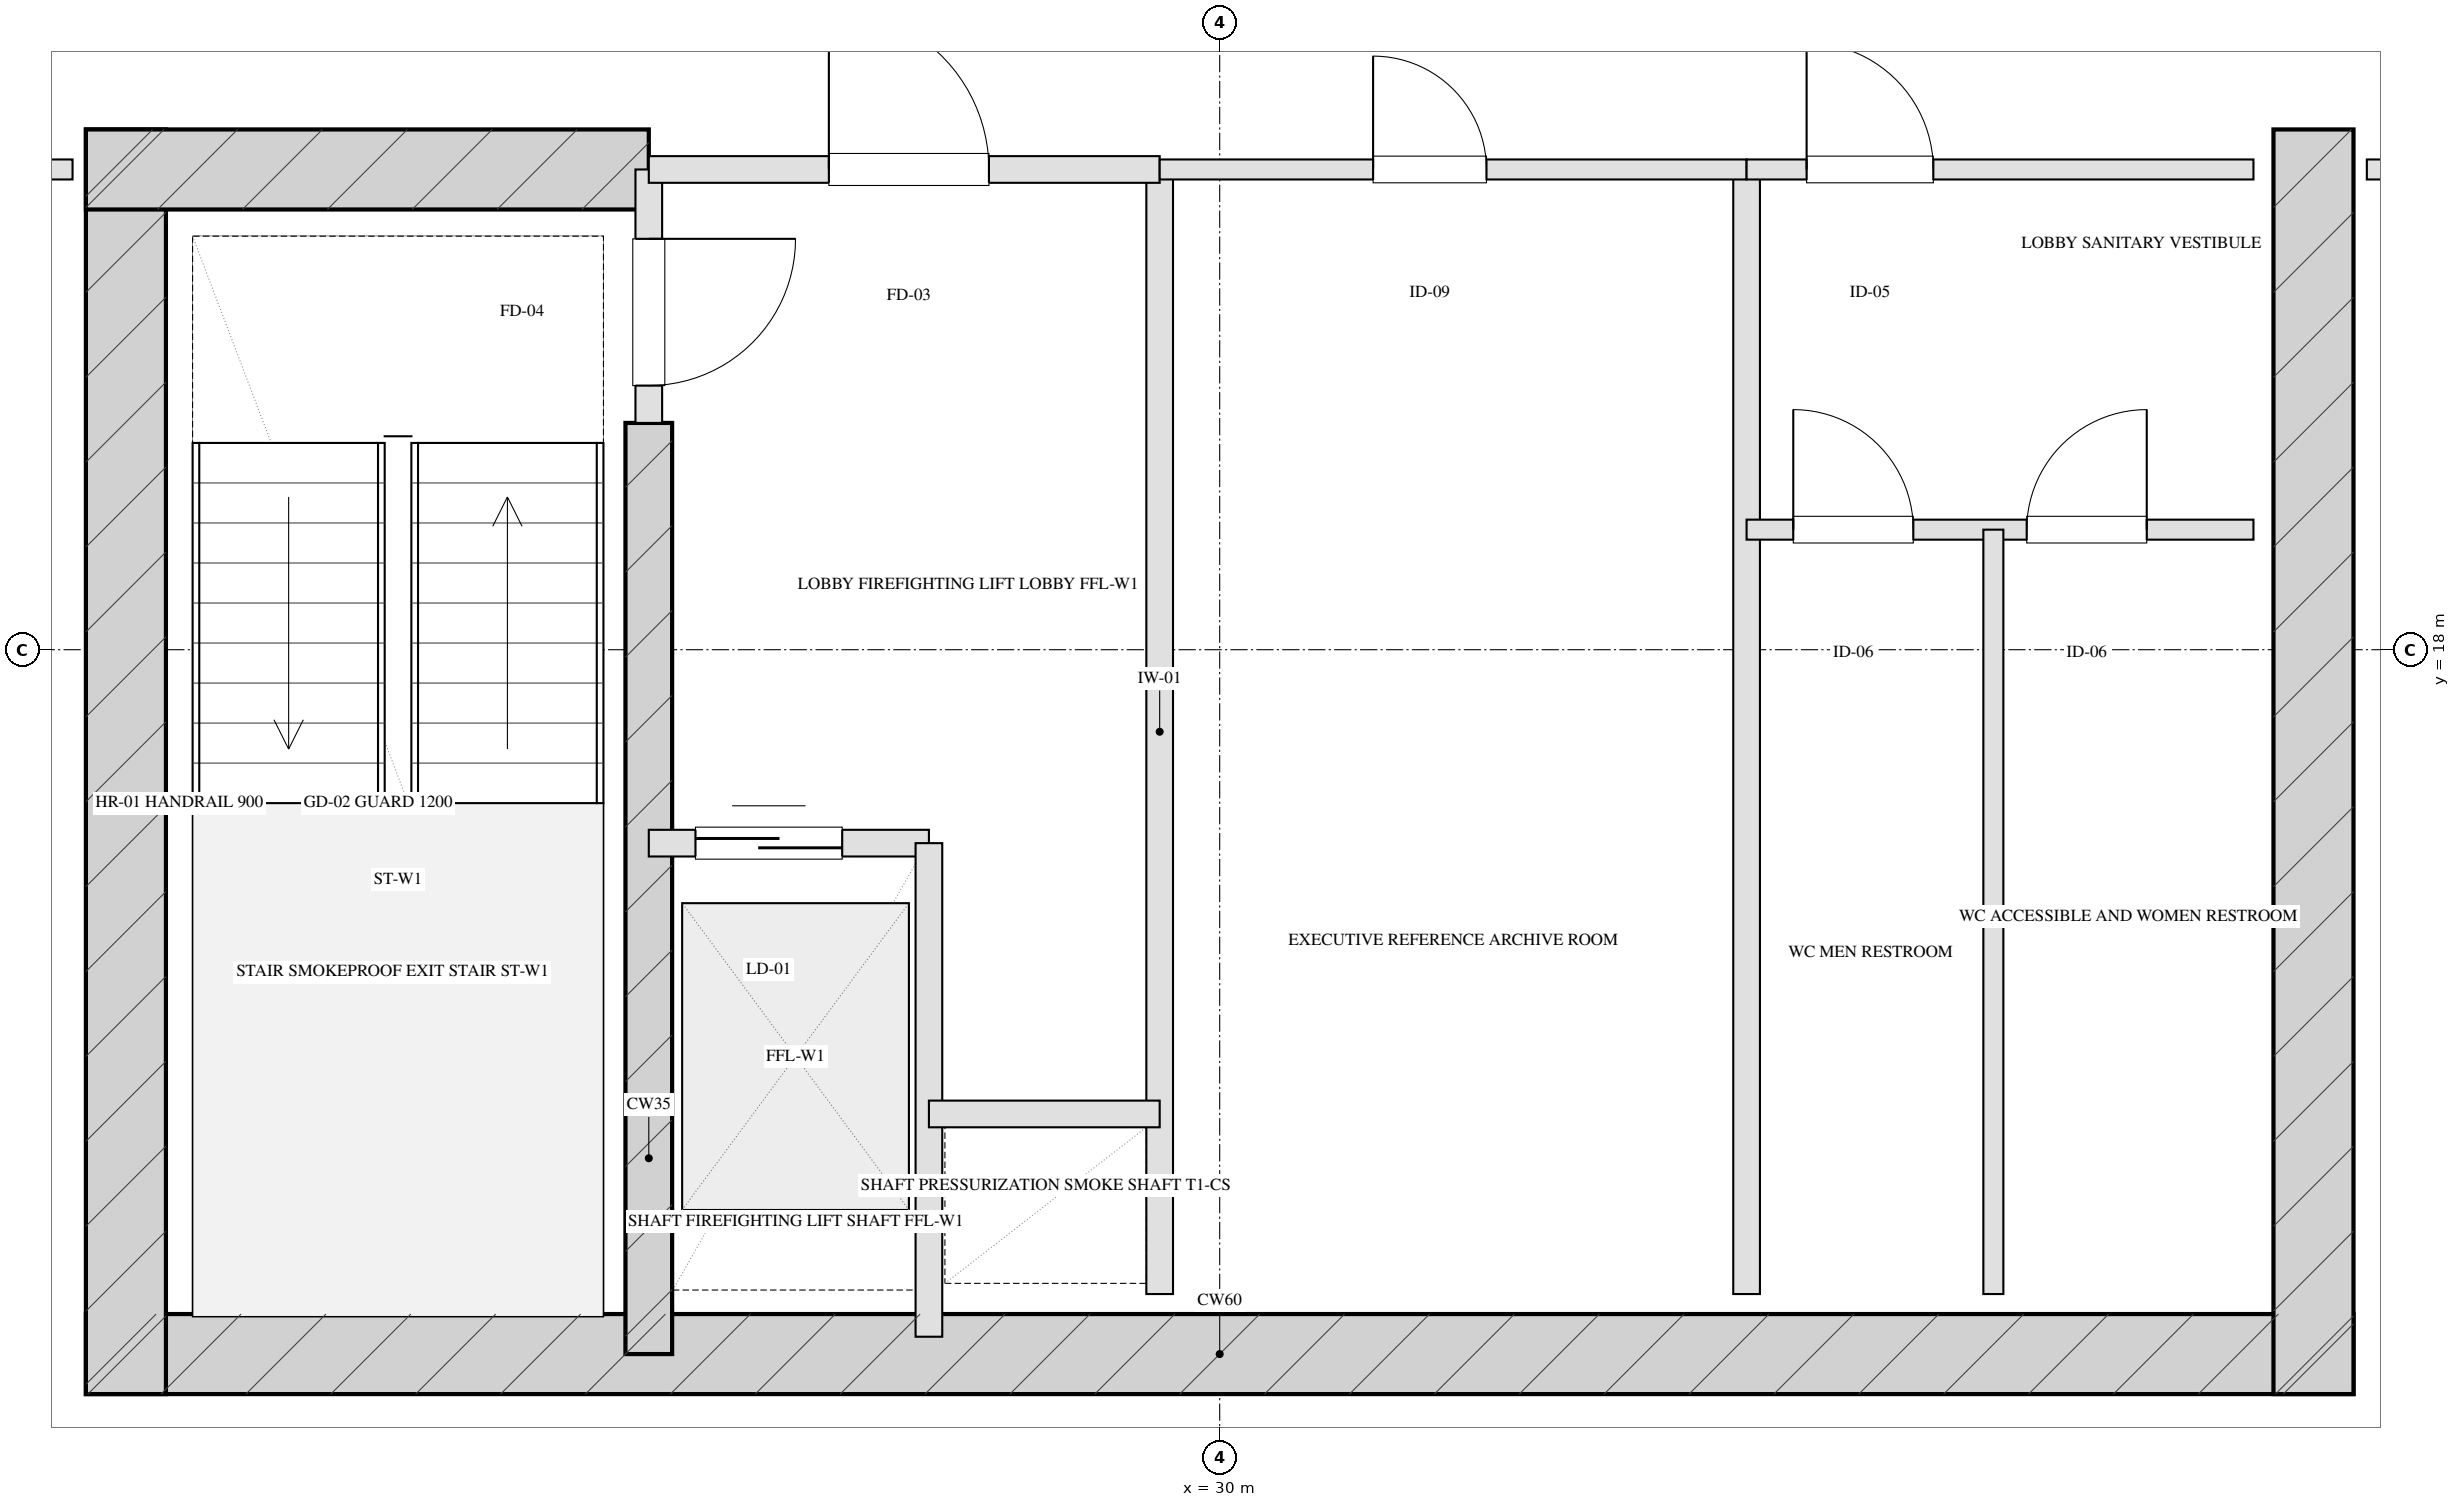
"""IFC4 building model, lengths in metres.
Left out: names, types, materials, properties, quantities, classifications, styles, units other than length and angle.
Written with IfcOpenShell. Run it as: python <this file> out.ifc"""

import sys

from ifc_helpers import new_model, si_unit, direction, frame, frame_2d, origin, place, context, subcontext, project, spatial, rectangle, extrude, element, fill, save


model = new_model("IFC4")
c1 = context("Model", 3, precision=1e-05, world=origin(), true_north=direction((0.0, 1.0)))
c2 = subcontext(c1, "Body", "Model", "MODEL_VIEW")
j1 = project(units=[si_unit("LENGTHUNIT", "METRE"), si_unit("PLANEANGLEUNIT", "RADIAN")], contexts=[c1])
p1 = place(None, origin())
s1 = spatial("IfcSite", under=j1, at=p1, CompositionType="ELEMENT")
p2 = place(p1, origin())
s2 = spatial("IfcBuilding", under=s1, at=p2, CompositionType="ELEMENT")
p3 = place(p2, frame((0.0, 0.0, 96.6)))
s3 = spatial("IfcBuildingStorey", under=s2, at=p3, CompositionType="ELEMENT", Elevation=96.6)
p4 = place(p3, frame((21.5, 12.72, 0.0), z_axis=(0.0, 0.0, 1.0), x_axis=(1.0, 0.0, 0.0)))
e1 = element("IfcWall", 1, at=p4, inside=s3, PredefinedType="SHEAR", context=c2, shape_type="SweptSolid", body=[
    extrude(rectangle(XDim=17.0, YDim=0.6, at=frame_2d((8.5, 0.0))), origin(), (0.0, 0.0, 1.0), 3.45),
])
for number, where, z_axis, x_axis in (
    (2, (21.8, 21.9, 0.0), (0.0, 0.0, 1.0), (0.0, -1.0, 0.0)),
    (3, (38.2, 21.9, 0.0), (0.0, 0.0, 1.0), (0.0, -1.0, 0.0)),
):
    element("IfcWall", number, at=place(p3, frame(where, z_axis=z_axis, x_axis=x_axis)), inside=s3, PredefinedType="SHEAR", context=c2, shape_type="SweptSolid", body=[
        extrude(rectangle(XDim=9.48, YDim=0.6, at=frame_2d((4.74, 0.0))), origin(), (0.0, 0.0, 1.0), 3.45),
    ])
p5 = place(p3, frame((25.72, 19.7, 0.0), z_axis=(0.0, 0.0, 1.0), x_axis=(0.0, -1.0, 0.0)))
e4 = element("IfcWall", 4, at=p5, inside=s3, PredefinedType="SHEAR", context=c2, shape_type="SweptSolid", body=[
    extrude(rectangle(XDim=6.98, YDim=0.35, at=frame_2d((3.49, 0.0))), origin(), (0.0, 0.0, 1.0), 3.45),
])
p6 = place(p3, frame((21.5, 21.6, 0.0), z_axis=(0.0, 0.0, 1.0), x_axis=(1.0, 0.0, 0.0)))
e5 = element("IfcWall", 5, at=p6, inside=s3, PredefinedType="SHEAR", context=c2, shape_type="SweptSolid", body=[
    extrude(rectangle(XDim=4.22, YDim=0.6, at=frame_2d((2.11, 0.0))), origin(), (0.0, 0.0, 1.0), 3.45),
])
p7 = place(p3, frame((25.72, 21.6, 0.0), z_axis=(0.0, 0.0, 1.0), x_axis=(0.0, -1.0, 0.0)))
e6 = element("IfcWall", 6, at=p7, inside=s3, PredefinedType="PARTITIONING", context=c2, shape_type="SweptSolid", body=[
    extrude(rectangle(XDim=1.9, YDim=0.2, at=frame_2d((0.95, 0.0))), origin(), (0.0, 0.0, 1.0), 3.155),
])
p8 = place(p7, frame((0.52, 0.0, 0.0)))
e7 = element("IfcOpeningElement", 7, at=p8, cuts=e6, PredefinedType="OPENING", context=c2, shape_type="SweptSolid", body=[
    extrude(rectangle(XDim=1.1, YDim=2.05, at=frame_2d((0.55, 1.025))), frame((0.0, 0.11, 0.0), z_axis=(0.0, -1.0, 0.0), x_axis=(1.0, 0.0, 0.0)), (0.0, 0.0, 1.0), 0.22),
])
p9 = place(p3, frame((29.55, 21.6, 0.0), z_axis=(0.0, 0.0, 1.0), x_axis=(0.0, -1.0, 0.0)))
e8 = element("IfcWall", 8, at=p9, inside=s3, PredefinedType="PARTITIONING", context=c2, shape_type="SweptSolid", body=[
    extrude(rectangle(XDim=8.43, YDim=0.2, at=frame_2d((4.215, 0.0))), origin(), (0.0, 0.0, 1.0), 3.155),
])
p10 = place(p3, frame((25.72, 21.6, 0.0), z_axis=(0.0, 0.0, 1.0), x_axis=(1.0, 0.0, 0.0)))
e9 = element("IfcWall", 9, at=p10, inside=s3, PredefinedType="PARTITIONING", context=c2, shape_type="SweptSolid", body=[
    extrude(rectangle(XDim=3.83, YDim=0.2, at=frame_2d((1.915, 0.0))), origin(), (0.0, 0.0, 1.0), 3.155),
])
p11 = place(p10, frame((1.35, 0.0, 0.0)))
e10 = element("IfcOpeningElement", 10, at=p11, cuts=e9, PredefinedType="OPENING", context=c2, shape_type="SweptSolid", body=[
    extrude(rectangle(XDim=1.2, YDim=2.05, at=frame_2d((0.6, 1.025))), frame((0.0, 0.11, 0.0), z_axis=(0.0, -1.0, 0.0), x_axis=(1.0, 0.0, 0.0)), (0.0, 0.0, 1.0), 0.22),
])
p12 = place(p3, frame((25.72, 16.55, 0.0), z_axis=(0.0, 0.0, 1.0), x_axis=(1.0, 0.0, 0.0)))
e11 = element("IfcWall", 11, at=p12, inside=s3, PredefinedType="PARTITIONING", context=c2, shape_type="SweptSolid", body=[
    extrude(rectangle(XDim=2.1, YDim=0.2, at=frame_2d((1.05, 0.0))), origin(), (0.0, 0.0, 1.0), 3.155),
])
p13 = place(p12, frame((0.35, 0.0, 0.0)))
e12 = element("IfcOpeningElement", 12, at=p13, cuts=e11, PredefinedType="OPENING", context=c2, shape_type="SweptSolid", body=[
    extrude(rectangle(XDim=1.1, YDim=2.05, at=frame_2d((0.55, 1.025))), frame((0.0, 0.11, 0.0), z_axis=(0.0, -1.0, 0.0), x_axis=(1.0, 0.0, 0.0)), (0.0, 0.0, 1.0), 0.22),
])
p14 = place(p3, frame((27.82, 16.55, 0.0), z_axis=(0.0, 0.0, 1.0), x_axis=(0.0, -1.0, 0.0)))
e13 = element("IfcWall", 13, at=p14, inside=s3, PredefinedType="PARTITIONING", context=c2, shape_type="SweptSolid", body=[
    extrude(rectangle(XDim=3.7, YDim=0.2, at=frame_2d((1.85, 0.0))), origin(), (0.0, 0.0, 1.0), 3.155),
])
p15 = place(p3, frame((27.82, 14.52, 0.0), z_axis=(0.0, 0.0, 1.0), x_axis=(1.0, 0.0, 0.0)))
e14 = element("IfcWall", 14, at=p15, inside=s3, PredefinedType="PARTITIONING", context=c2, shape_type="SweptSolid", body=[
    extrude(rectangle(XDim=1.73, YDim=0.2, at=frame_2d((0.865, 0.0))), origin(), (0.0, 0.0, 1.0), 3.155),
])
p16 = place(p3, frame((33.95, 21.6, 0.0), z_axis=(0.0, 0.0, 1.0), x_axis=(0.0, -1.0, 0.0)))
e15 = element("IfcWall", 15, at=p16, inside=s3, PredefinedType="PARTITIONING", context=c2, shape_type="SweptSolid", body=[
    extrude(rectangle(XDim=8.43, YDim=0.2, at=frame_2d((4.215, 0.0))), origin(), (0.0, 0.0, 1.0), 3.155),
])
p17 = place(p3, frame((29.55, 21.6, 0.0), z_axis=(0.0, 0.0, 1.0), x_axis=(1.0, 0.0, 0.0)))
e16 = element("IfcWall", 16, at=p17, inside=s3, PredefinedType="PARTITIONING", context=c2, shape_type="SweptSolid", body=[
    extrude(rectangle(XDim=4.4, YDim=0.15, at=frame_2d((2.2, 0.0))), origin(), (0.0, 0.0, 1.0), 3.155),
])
p18 = place(p17, frame((1.6, 0.0, 0.0)))
e17 = element("IfcOpeningElement", 17, at=p18, cuts=e16, PredefinedType="OPENING", context=c2, shape_type="SweptSolid", body=[
    extrude(rectangle(XDim=0.85, YDim=2.05, at=frame_2d((0.425, 1.025))), frame((0.0, 0.085, 0.0), z_axis=(0.0, -1.0, 0.0), x_axis=(1.0, 0.0, 0.0)), (0.0, 0.0, 1.0), 0.17),
])
p19 = place(p3, frame((33.95, 21.6, 0.0), z_axis=(0.0, 0.0, 1.0), x_axis=(1.0, 0.0, 0.0)))
e18 = element("IfcWall", 18, at=p19, inside=s3, PredefinedType="PARTITIONING", context=c2, shape_type="SweptSolid", body=[
    extrude(rectangle(XDim=3.8, YDim=0.15, at=frame_2d((1.9, 0.0))), origin(), (0.0, 0.0, 1.0), 3.155),
])
p20 = place(p19, frame((0.45, 0.0, 0.0)))
e19 = element("IfcOpeningElement", 19, at=p20, cuts=e18, PredefinedType="OPENING", context=c2, shape_type="SweptSolid", body=[
    extrude(rectangle(XDim=0.95, YDim=2.05, at=frame_2d((0.475, 1.025))), frame((0.0, 0.085, 0.0), z_axis=(0.0, -1.0, 0.0), x_axis=(1.0, 0.0, 0.0)), (0.0, 0.0, 1.0), 0.17),
])
p21 = place(p3, frame((33.95, 18.9, 0.0), z_axis=(0.0, 0.0, 1.0), x_axis=(1.0, 0.0, 0.0)))
e20 = element("IfcWall", 20, at=p21, inside=s3, PredefinedType="PARTITIONING", context=c2, shape_type="SweptSolid", body=[
    extrude(rectangle(XDim=3.8, YDim=0.15, at=frame_2d((1.9, 0.0))), origin(), (0.0, 0.0, 1.0), 3.155),
])
p22 = place(p21, frame((0.35, 0.0, 0.0)))
e21 = element("IfcOpeningElement", 21, at=p22, cuts=e20, PredefinedType="OPENING", context=c2, shape_type="SweptSolid", body=[
    extrude(rectangle(XDim=0.9, YDim=2.05, at=frame_2d((0.45, 1.025))), frame((0.0, 0.085, 0.0), z_axis=(0.0, -1.0, 0.0), x_axis=(1.0, 0.0, 0.0)), (0.0, 0.0, 1.0), 0.17),
])
p23 = place(p21, frame((2.1, 0.0, 0.0)))
e22 = element("IfcOpeningElement", 22, at=p23, cuts=e20, PredefinedType="OPENING", context=c2, shape_type="SweptSolid", body=[
    extrude(rectangle(XDim=0.9, YDim=2.05, at=frame_2d((0.45, 1.025))), frame((0.0, 0.085, 0.0), z_axis=(0.0, -1.0, 0.0), x_axis=(1.0, 0.0, 0.0)), (0.0, 0.0, 1.0), 0.17),
])
p24 = place(p3, frame((35.8, 18.9, 0.0), z_axis=(0.0, 0.0, 1.0), x_axis=(0.0, -1.0, 0.0)))
e23 = element("IfcWall", 23, at=p24, inside=s3, PredefinedType="PARTITIONING", context=c2, shape_type="SweptSolid", body=[
    extrude(rectangle(XDim=5.73, YDim=0.15, at=frame_2d((2.865, 0.0))), origin(), (0.0, 0.0, 1.0), 3.155),
])
p25 = place(p3, frame((11.4, 21.6, 0.0), z_axis=(0.0, 0.0, 1.0), x_axis=(1.0, 0.0, 0.0)))
e24 = element("IfcWall", 24, at=p25, inside=s3, PredefinedType="PARTITIONING", context=c2, shape_type="SweptSolid", body=[
    extrude(rectangle(XDim=10.0, YDim=0.15, at=frame_2d((5.0, 0.0))), origin(), (0.0, 0.0, 1.0), 3.155),
])
p26 = place(p25, frame((4.2, 0.0, 0.0)))
e25 = element("IfcOpeningElement", 25, at=p26, cuts=e24, PredefinedType="OPENING", context=c2, shape_type="SweptSolid", body=[
    extrude(rectangle(XDim=1.0, YDim=2.05, at=frame_2d((0.5, 1.025))), frame((0.0, 0.085, 0.0), z_axis=(0.0, -1.0, 0.0), x_axis=(1.0, 0.0, 0.0)), (0.0, 0.0, 1.0), 0.17),
])
p27 = place(p3, frame((38.6, 21.6, 0.0), z_axis=(0.0, 0.0, 1.0), x_axis=(1.0, 0.0, 0.0)))
e26 = element("IfcWall", 26, at=p27, inside=s3, PredefinedType="PARTITIONING", context=c2, shape_type="SweptSolid", body=[
    extrude(rectangle(XDim=10.0, YDim=0.15, at=frame_2d((5.0, 0.0))), origin(), (0.0, 0.0, 1.0), 3.155),
])
p28 = place(p27, frame((4.2, 0.0, 0.0)))
e27 = element("IfcOpeningElement", 27, at=p28, cuts=e26, PredefinedType="OPENING", context=c2, shape_type="SweptSolid", body=[
    extrude(rectangle(XDim=1.0, YDim=2.05, at=frame_2d((0.5, 1.025))), frame((0.0, 0.085, 0.0), z_axis=(0.0, -1.0, 0.0), x_axis=(1.0, 0.0, 0.0)), (0.0, 0.0, 1.0), 0.17),
])
p29 = place(p8, origin())
e28 = element("IfcDoor", 28, at=p29, inside=s3, OperationType="SINGLE_SWING_LEFT", PredefinedType="DOOR", context=c2, shape_type="SweptSolid", body=[
    extrude(rectangle(XDim=1.1, YDim=2.05, at=frame_2d((0.55, 1.025))), frame((0.0, 0.025, 0.0), z_axis=(0.0, -1.0, 0.0), x_axis=(1.0, 0.0, 0.0)), (0.0, 0.0, 1.0), 0.05),
])
fill(e7, e28)
p30 = place(p11, origin())
e29 = element("IfcDoor", 29, at=p30, inside=s3, OperationType="SINGLE_SWING_LEFT", PredefinedType="DOOR", context=c2, shape_type="SweptSolid", body=[
    extrude(rectangle(XDim=1.2, YDim=2.05, at=frame_2d((0.6, 1.025))), frame((0.0, 0.025, 0.0), z_axis=(0.0, -1.0, 0.0), x_axis=(1.0, 0.0, 0.0)), (0.0, 0.0, 1.0), 0.05),
])
fill(e10, e29)
p31 = place(p13, origin())
e30 = element("IfcDoor", 30, at=p31, inside=s3, OperationType="DOUBLE_DOOR_SLIDING", PredefinedType="DOOR", context=c2, shape_type="SweptSolid", body=[
    extrude(rectangle(XDim=1.1, YDim=2.05, at=frame_2d((0.55, 1.025))), frame((0.0, 0.025, 0.0), z_axis=(0.0, -1.0, 0.0), x_axis=(1.0, 0.0, 0.0)), (0.0, 0.0, 1.0), 0.05),
])
fill(e12, e30)
p32 = place(p18, origin())
e31 = element("IfcDoor", 31, at=p32, inside=s3, OperationType="SINGLE_SWING_LEFT", PredefinedType="DOOR", context=c2, shape_type="SweptSolid", body=[
    extrude(rectangle(XDim=0.85, YDim=2.05, at=frame_2d((0.425, 1.025))), frame((0.0, 0.025, 0.0), z_axis=(0.0, -1.0, 0.0), x_axis=(1.0, 0.0, 0.0)), (0.0, 0.0, 1.0), 0.05),
])
fill(e17, e31)
p33 = place(p20, origin())
e32 = element("IfcDoor", 32, at=p33, inside=s3, OperationType="SINGLE_SWING_LEFT", PredefinedType="DOOR", context=c2, shape_type="SweptSolid", body=[
    extrude(rectangle(XDim=0.95, YDim=2.05, at=frame_2d((0.475, 1.025))), frame((0.0, 0.025, 0.0), z_axis=(0.0, -1.0, 0.0), x_axis=(1.0, 0.0, 0.0)), (0.0, 0.0, 1.0), 0.05),
])
fill(e19, e32)
p34 = place(p22, origin())
e33 = element("IfcDoor", 33, at=p34, inside=s3, OperationType="SINGLE_SWING_LEFT", PredefinedType="DOOR", context=c2, shape_type="SweptSolid", body=[
    extrude(rectangle(XDim=0.9, YDim=2.05, at=frame_2d((0.45, 1.025))), frame((0.0, 0.025, 0.0), z_axis=(0.0, -1.0, 0.0), x_axis=(1.0, 0.0, 0.0)), (0.0, 0.0, 1.0), 0.05),
])
fill(e21, e33)
p35 = place(p23, origin())
e34 = element("IfcDoor", 34, at=p35, inside=s3, OperationType="SINGLE_SWING_RIGHT", PredefinedType="DOOR", context=c2, shape_type="SweptSolid", body=[
    extrude(rectangle(XDim=0.9, YDim=2.05, at=frame_2d((0.45, 1.025))), frame((0.0, 0.025, 0.0), z_axis=(0.0, -1.0, 0.0), x_axis=(1.0, 0.0, 0.0)), (0.0, 0.0, 1.0), 0.05),
])
fill(e22, e34)
save(model, sys.argv[1])
